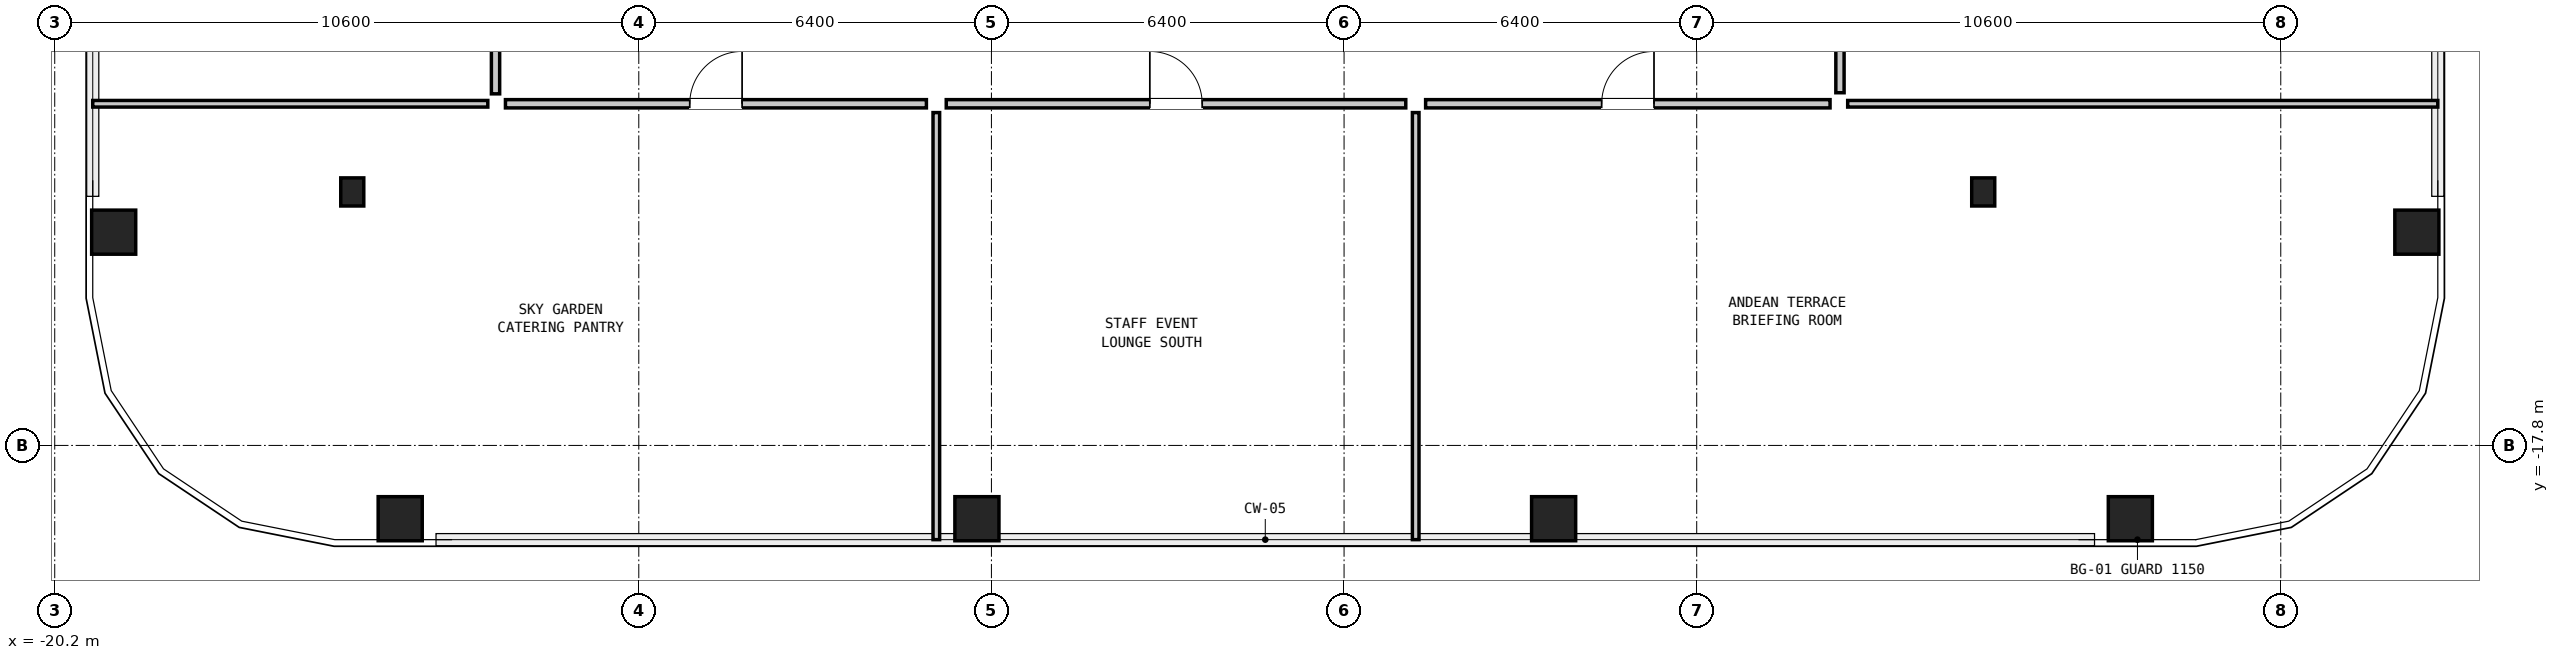
"""IFC4 building model, lengths in metres.
Left out: names, types, materials, properties, quantities, classifications, styles, units other than length and angle.
Written with IfcOpenShell. Run it as: python <this file> out.ifc"""

import sys

from ifc_helpers import new_model, si_unit, direction, frame, frame_2d, origin, origin_2d, place, context, subcontext, project, spatial, rectangle, hollow_rectangle, i_section, extrude, element, fill, save


model = new_model("IFC4")
c1 = context("Model", 3, precision=1e-05, world=origin(), true_north=direction((0.0, 1.0)))
c2 = subcontext(c1, "Body", "Model", "MODEL_VIEW")
j1 = project(units=[si_unit("LENGTHUNIT", "METRE"), si_unit("PLANEANGLEUNIT", "RADIAN")], contexts=[c1])
p1 = place(None, origin())
s1 = spatial("IfcSite", under=j1, at=p1, CompositionType="ELEMENT")
p2 = place(p1, origin())
s2 = spatial("IfcBuilding", under=s1, at=p2, CompositionType="ELEMENT")
p3 = place(p2, frame((0.0, 0.0, 61.5)))
s3 = spatial("IfcBuildingStorey", under=s2, at=p3, CompositionType="ELEMENT", Elevation=61.5)
for number, where, z_axis, x_axis in (
    (1, (-13.93, -19.13, 0.0), (0.0, 0.0, 1.0), (1.0, 0.0, 0.0)),
    (2, (-3.463, -19.13, 0.0), (0.0, 0.0, 1.0), (1.0, 0.0, 0.0)),
    (3, (7.003, -19.13, 0.0), (0.0, 0.0, 1.0), (1.0, 0.0, 0.0)),
    (4, (17.47, -19.13, 0.0), (0.0, 0.0, 1.0), (1.0, 0.0, 0.0)),
    (5, (22.67, -13.93, 0.0), (0.0, 0.0, 1.0), (0.0, 1.0, 0.0)),
    (6, (-19.13, -13.93, 0.0), (0.0, 0.0, 1.0), (0.0, 1.0, 0.0)),
):
    element("IfcColumn", number, at=place(p3, frame(where, z_axis=z_axis, x_axis=x_axis)), inside=s3, PredefinedType="COLUMN", context=c2, shape_type="SweptSolid", body=[
        extrude(hollow_rectangle(XDim=0.8, YDim=0.8, WallThickness=0.05, at=origin_2d()), origin(), (0.0, 0.0, 1.0), 3.6),
    ])
for number, where, z_axis, x_axis in (
    (7, (-14.8, -13.2, 0.0), (0.0, 0.0, 1.0), (1.0, 0.0, 0.0)),
    (8, (14.8, -13.2, 0.0), (0.0, 0.0, 1.0), (1.0, 0.0, 0.0)),
):
    element("IfcColumn", number, at=place(p3, frame(where, z_axis=z_axis, x_axis=x_axis)), inside=s3, PredefinedType="COLUMN", context=c2, shape_type="SweptSolid", body=[
        extrude(i_section(OverallWidth=0.418, OverallDepth=0.51, WebThickness=0.042, FlangeThickness=0.068, at=origin_2d()), origin(), (0.0, 0.0, 1.0), 3.6),
    ])
p4 = place(p3, frame((-19.51, -11.6, 0.0), z_axis=(0.0, 0.0, 1.0), x_axis=(1.0, 0.0, 0.0)))
e9 = element("IfcWall", 9, at=p4, inside=s3, PredefinedType="PARTITIONING", context=c2, shape_type="SweptSolid", body=[
    extrude(rectangle(XDim=7.17, YDim=0.12, at=frame_2d((3.585, 0.0))), origin(), (0.0, 0.0, 1.0), 2.438),
])
p5 = place(p3, frame((12.34, -11.6, 0.0), z_axis=(0.0, 0.0, 1.0), x_axis=(1.0, 0.0, 0.0)))
e10 = element("IfcWall", 10, at=p5, inside=s3, PredefinedType="PARTITIONING", context=c2, shape_type="SweptSolid", body=[
    extrude(rectangle(XDim=10.71, YDim=0.12, at=frame_2d((5.355, 0.0))), origin(), (0.0, 0.0, 1.0), 2.438),
])
for number, where, z_axis, x_axis in (
    (11, (-4.2, -19.51, 0.0), (0.0, 0.0, 1.0), (0.0, 1.0, 0.0)),
    (12, (4.5, -19.51, 0.0), (0.0, 0.0, 1.0), (0.0, 1.0, 0.0)),
):
    element("IfcWall", number, at=place(p3, frame(where, z_axis=z_axis, x_axis=x_axis)), inside=s3, PredefinedType="PARTITIONING", context=c2, shape_type="SweptSolid", body=[
        extrude(rectangle(XDim=7.75, YDim=0.12, at=frame_2d((3.875, 0.0))), origin(), (0.0, 0.0, 1.0), 3.22),
    ])
p6 = place(p3, frame((-12.02, -11.6, 0.0), z_axis=(0.0, 0.0, 1.0), x_axis=(1.0, 0.0, 0.0)))
e13 = element("IfcWall", 13, at=p6, inside=s3, PredefinedType="PARTITIONING", context=c2, shape_type="SweptSolid", body=[
    extrude(rectangle(XDim=7.64, YDim=0.15, at=frame_2d((3.82, 0.0))), origin(), (0.0, 0.0, 1.0), 2.438),
])
p7 = place(p6, frame((3.345, 0.0, 0.0)))
e14 = element("IfcOpeningElement", 14, at=p7, cuts=e13, PredefinedType="OPENING", context=c2, shape_type="SweptSolid", body=[
    extrude(rectangle(XDim=0.95, YDim=2.1, at=frame_2d((0.475, 1.05))), frame((0.0, 0.087, 0.0), z_axis=(0.0, -1.0, 0.0), x_axis=(1.0, 0.0, 0.0)), (0.0, 0.0, 1.0), 0.174),
])
p8 = place(p3, frame((-4.02, -11.6, 0.0), z_axis=(0.0, 0.0, 1.0), x_axis=(1.0, 0.0, 0.0)))
e15 = element("IfcWall", 15, at=p8, inside=s3, PredefinedType="PARTITIONING", context=c2, shape_type="SweptSolid", body=[
    extrude(rectangle(XDim=8.34, YDim=0.15, at=frame_2d((4.17, 0.0))), origin(), (0.0, 0.0, 1.0), 3.22),
])
p9 = place(p8, frame((3.695, 0.0, 0.0)))
e16 = element("IfcOpeningElement", 16, at=p9, cuts=e15, PredefinedType="OPENING", context=c2, shape_type="SweptSolid", body=[
    extrude(rectangle(XDim=0.95, YDim=2.1, at=frame_2d((0.475, 1.05))), frame((0.0, 0.087, 0.0), z_axis=(0.0, -1.0, 0.0), x_axis=(1.0, 0.0, 0.0)), (0.0, 0.0, 1.0), 0.174),
])
p10 = place(p3, frame((4.68, -11.6, 0.0), z_axis=(0.0, 0.0, 1.0), x_axis=(1.0, 0.0, 0.0)))
e17 = element("IfcWall", 17, at=p10, inside=s3, PredefinedType="PARTITIONING", context=c2, shape_type="SweptSolid", body=[
    extrude(rectangle(XDim=7.34, YDim=0.15, at=frame_2d((3.67, 0.0))), origin(), (0.0, 0.0, 1.0), 2.438),
])
p11 = place(p10, frame((3.195, 0.0, 0.0)))
e18 = element("IfcOpeningElement", 18, at=p11, cuts=e17, PredefinedType="OPENING", context=c2, shape_type="SweptSolid", body=[
    extrude(rectangle(XDim=0.95, YDim=2.1, at=frame_2d((0.475, 1.05))), frame((0.0, 0.087, 0.0), z_axis=(0.0, -1.0, 0.0), x_axis=(1.0, 0.0, 0.0)), (0.0, 0.0, 1.0), 0.174),
])
p12 = place(p3, frame((-12.2, -11.42, 0.0), z_axis=(0.0, 0.0, 1.0), x_axis=(0.0, 1.0, 0.0)))
e19 = element("IfcWall", 19, at=p12, inside=s3, PredefinedType="PARTITIONING", context=c2, shape_type="SweptSolid", body=[
    extrude(rectangle(XDim=24.04, YDim=0.15, at=frame_2d((12.02, 0.0))), origin(), (0.0, 0.0, 1.0), 3.22),
])
p13 = place(p12, frame((11.545, 0.0, 0.0)))
e20 = element("IfcOpeningElement", 20, at=p13, cuts=e19, PredefinedType="OPENING", context=c2, shape_type="SweptSolid", body=[
    extrude(rectangle(XDim=0.95, YDim=2.1, at=frame_2d((0.475, 1.05))), frame((0.0, 0.087, 0.0), z_axis=(0.0, -1.0, 0.0), x_axis=(1.0, 0.0, 0.0)), (0.0, 0.0, 1.0), 0.174),
])
p14 = place(p3, frame((12.2, -11.4, 0.0), z_axis=(0.0, 0.0, 1.0), x_axis=(0.0, 1.0, 0.0)))
e21 = element("IfcWall", 21, at=p14, inside=s3, PredefinedType="PARTITIONING", context=c2, shape_type="SweptSolid", body=[
    extrude(rectangle(XDim=8.84, YDim=0.15, at=frame_2d((4.42, 0.0))), origin(), (0.0, 0.0, 1.0), 3.22),
])
p15 = place(p14, frame((3.82, 0.0, 0.0)))
e22 = element("IfcOpeningElement", 22, at=p15, cuts=e21, PredefinedType="OPENING", context=c2, shape_type="SweptSolid", body=[
    extrude(rectangle(XDim=1.2, YDim=2.1, at=frame_2d((0.6, 1.05))), frame((0.0, 0.087, 0.0), z_axis=(0.0, -1.0, 0.0), x_axis=(1.0, 0.0, 0.0)), (0.0, 0.0, 1.0), 0.174),
])
p16 = place(p7, origin())
e23 = element("IfcDoor", 23, at=p16, inside=s3, OperationType="SINGLE_SWING_RIGHT", PredefinedType="DOOR", context=c2, shape_type="SweptSolid", body=[
    extrude(rectangle(XDim=0.95, YDim=2.1, at=frame_2d((0.475, 1.05))), frame((0.0, 0.025, 0.0), z_axis=(0.0, -1.0, 0.0), x_axis=(1.0, 0.0, 0.0)), (0.0, 0.0, 1.0), 0.05),
])
fill(e14, e23)
p17 = place(p9, origin())
e24 = element("IfcDoor", 24, at=p17, inside=s3, OperationType="SINGLE_SWING_LEFT", PredefinedType="DOOR", context=c2, shape_type="SweptSolid", body=[
    extrude(rectangle(XDim=0.95, YDim=2.1, at=frame_2d((0.475, 1.05))), frame((0.0, 0.025, 0.0), z_axis=(0.0, -1.0, 0.0), x_axis=(1.0, 0.0, 0.0)), (0.0, 0.0, 1.0), 0.05),
])
fill(e16, e24)
p18 = place(p11, origin())
e25 = element("IfcDoor", 25, at=p18, inside=s3, OperationType="SINGLE_SWING_RIGHT", PredefinedType="DOOR", context=c2, shape_type="SweptSolid", body=[
    extrude(rectangle(XDim=0.95, YDim=2.1, at=frame_2d((0.475, 1.05))), frame((0.0, 0.025, 0.0), z_axis=(0.0, -1.0, 0.0), x_axis=(1.0, 0.0, 0.0)), (0.0, 0.0, 1.0), 0.05),
])
fill(e18, e25)
save(model, sys.argv[1])
